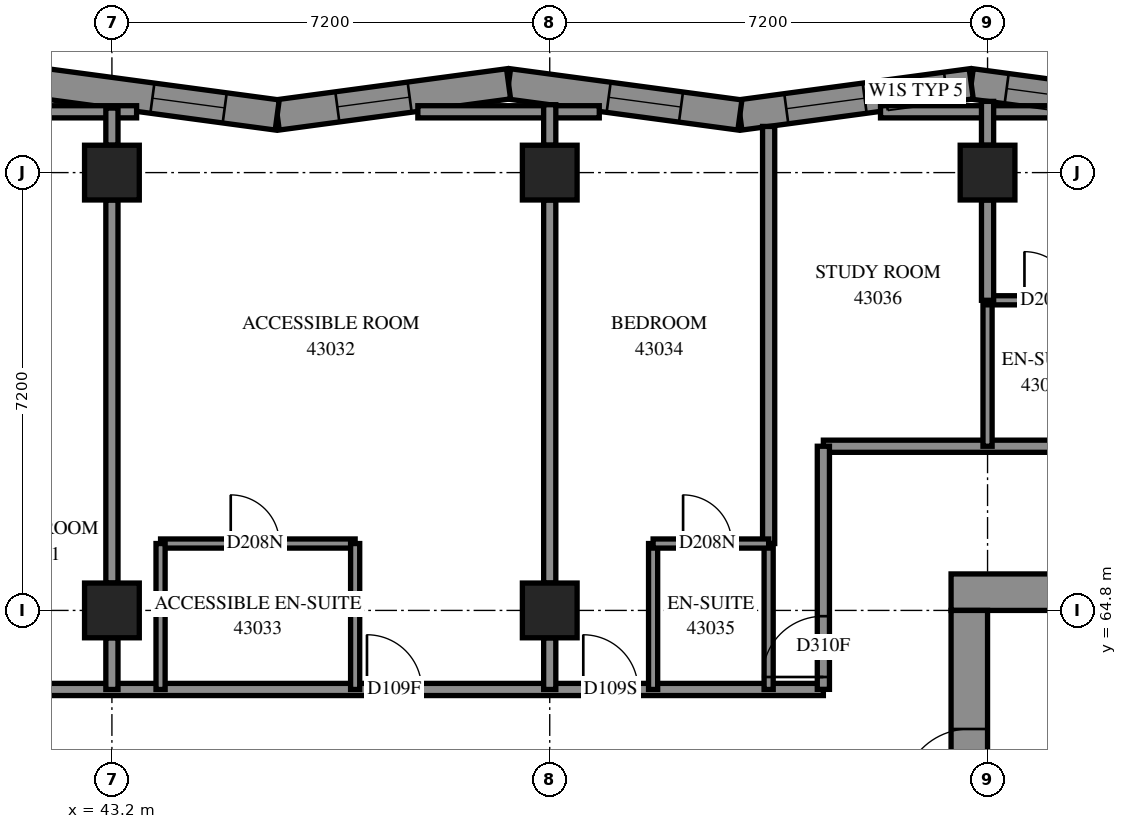
"""IFC4 building model, lengths in metres.
Left out: names, types, materials, properties, quantities, classifications, styles, units other than length and angle.
Written with IfcOpenShell. Run it as: python <this file> out.ifc"""

import sys

from ifc_helpers import new_model, si_unit, direction, frame, frame_2d, origin, origin_2d, place, context, subcontext, project, spatial, polyline, rectangle, outline, extrude, element, fill, save


model = new_model("IFC4")
c1 = context("Model", 3, precision=1e-05, world=origin(), true_north=direction((0.0, 1.0)))
c2 = subcontext(c1, "Body", "Model", "MODEL_VIEW")
j1 = project(units=[si_unit("LENGTHUNIT", "METRE"), si_unit("PLANEANGLEUNIT", "RADIAN")], contexts=[c1])
p1 = place(None, origin())
s1 = spatial("IfcSite", under=j1, at=p1, CompositionType="ELEMENT")
p2 = place(p1, origin())
s2 = spatial("IfcBuilding", under=s1, at=p2, CompositionType="ELEMENT")
p3 = place(p2, frame((0.0, 0.0, 159.2)))
s3 = spatial("IfcBuildingStorey", under=s2, at=p3, CompositionType="ELEMENT", Elevation=159.2)
for number, where, z_axis, x_axis in (
    (1, (43.2, 64.8, 0.0), (0.0, 0.0, 1.0), (1.0, 0.0, 0.0)),
    (2, (43.2, 72.0, 0.0), (0.0, 0.0, 1.0), (1.0, 0.0, 0.0)),
    (3, (50.4, 64.8, 0.0), (0.0, 0.0, 1.0), (1.0, 0.0, 0.0)),
    (4, (50.4, 72.0, 0.0), (0.0, 0.0, 1.0), (1.0, 0.0, 0.0)),
    (5, (57.6, 72.0, 0.0), (0.0, 0.0, 1.0), (1.0, 0.0, 0.0)),
):
    element("IfcColumn", number, at=place(p3, frame(where, z_axis=z_axis, x_axis=x_axis)), inside=s3, PredefinedType="COLUMN", context=c2, shape_type="SweptSolid", body=[
        extrude(rectangle(XDim=0.9, YDim=0.9, at=origin_2d()), origin(), (0.0, 0.0, 1.0), 3.1),
    ])
p4 = place(p3, frame((57.0, 65.1, -0.3), z_axis=(0.0, 0.0, 1.0), x_axis=(1.0, 0.0, 0.0)))
e6 = element("IfcWall", 6, at=p4, inside=s3, PredefinedType="SHEAR", context=c2, shape_type="SweptSolid", body=[
    extrude(rectangle(XDim=15.6, YDim=0.6, at=frame_2d((7.8, 0.0))), origin(), (0.0, 0.0, 1.0), 2.7),
])
p5 = place(p4, frame((10.6, 0.0, 0.3)))
e7 = element("IfcOpeningElement", 7, at=p5, cuts=e6, PredefinedType="OPENING", context=c2, shape_type="SweptSolid", body=[
    extrude(rectangle(XDim=0.8, YDim=2.1, at=frame_2d((0.4, 1.05))), frame((0.0, 0.31, 0.0), z_axis=(0.0, -1.0, 0.0), x_axis=(1.0, 0.0, 0.0)), (0.0, 0.0, 1.0), 0.62),
])
p6 = place(p3, frame((57.3, 50.4, -0.3), z_axis=(0.0, 0.0, 1.0), x_axis=(0.0, 1.0, 0.0)))
e8 = element("IfcWall", 8, at=p6, inside=s3, PredefinedType="SHEAR", context=c2, shape_type="SweptSolid", body=[
    extrude(rectangle(XDim=14.4, YDim=0.6, at=frame_2d((7.2, 0.0))), origin(), (0.0, 0.0, 1.0), 2.7),
])
p7 = place(p6, frame((4.55, 0.0, 0.3)))
e9 = element("IfcOpeningElement", 9, at=p7, cuts=e8, PredefinedType="OPENING", context=c2, shape_type="SweptSolid", body=[
    extrude(rectangle(XDim=1.1, YDim=2.1, at=frame_2d((0.55, 1.05))), frame((0.0, 0.31, 0.0), z_axis=(0.0, -1.0, 0.0), x_axis=(1.0, 0.0, 0.0)), (0.0, 0.0, 1.0), 0.62),
])
p8 = place(p6, frame((11.35, 0.0, 0.3)))
e10 = element("IfcOpeningElement", 10, at=p8, cuts=e8, PredefinedType="OPENING", context=c2, shape_type="SweptSolid", body=[
    extrude(rectangle(XDim=1.1, YDim=2.1, at=frame_2d((0.55, 1.05))), frame((0.0, 0.31, 0.0), z_axis=(0.0, -1.0, 0.0), x_axis=(1.0, 0.0, 0.0)), (0.0, 0.0, 1.0), 0.62),
])
p9 = place(p3, frame((61.136, 72.948, 0.0), z_axis=(0.0, 0.0, 1.0), x_axis=(-0.9910647018, 0.133381996, 0.0)))
e11 = element("IfcWall", 11, at=p9, inside=s3, PredefinedType="SOLIDWALL", context=c2, shape_type="SweptSolid", body=[
    extrude(outline(polyline([(0.034, -0.25), (3.872, -0.25), (3.805, 0.25), (-0.034, 0.25), (0.034, -0.25)])), origin(), (0.0, 0.0, 1.0), 3.1),
])
p10 = place(p9, frame((0.701, 0.0, 0.45)))
e12 = element("IfcOpeningElement", 12, at=p10, cuts=e11, PredefinedType="OPENING", context=c2, shape_type="SweptSolid", body=[
    extrude(rectangle(XDim=1.3, YDim=2.5, at=frame_2d((0.65, 1.25))), frame((0.0, 0.26, 0.0), z_axis=(0.0, -1.0, 0.0), x_axis=(1.0, 0.0, 0.0)), (0.0, 0.0, 1.0), 0.52),
])
p11 = place(p9, frame((2.451, 0.0, 0.45)))
e13 = element("IfcOpeningElement", 13, at=p11, cuts=e11, PredefinedType="OPENING", context=c2, shape_type="SweptSolid", body=[
    extrude(rectangle(XDim=0.8, YDim=2.5, at=frame_2d((0.4, 1.25))), frame((0.0, 0.26, 0.0), z_axis=(0.0, -1.0, 0.0), x_axis=(1.0, 0.0, 0.0)), (0.0, 0.0, 1.0), 0.52),
])
p12 = place(p3, frame((57.332, 73.46, 0.0), z_axis=(0.0, 0.0, 1.0), x_axis=(-0.9910651652, -0.1333785524, 0.0)))
e14 = element("IfcWall", 14, at=p12, inside=s3, PredefinedType="SOLIDWALL", context=c2, shape_type="SweptSolid", body=[
    extrude(outline(polyline([(-0.034, -0.25), (3.805, -0.25), (3.872, 0.25), (0.034, 0.25), (-0.034, -0.25)])), origin(), (0.0, 0.0, 1.0), 3.1),
])
p13 = place(p12, frame((0.419, 0.0, 0.45)))
e15 = element("IfcOpeningElement", 15, at=p13, cuts=e14, PredefinedType="OPENING", context=c2, shape_type="SweptSolid", body=[
    extrude(rectangle(XDim=1.0, YDim=2.5, at=frame_2d((0.5, 1.25))), frame((0.0, 0.26, 0.0), z_axis=(0.0, -1.0, 0.0), x_axis=(1.0, 0.0, 0.0)), (0.0, 0.0, 1.0), 0.52),
])
p14 = place(p12, frame((1.769, 0.0, 0.45)))
e16 = element("IfcOpeningElement", 16, at=p14, cuts=e14, PredefinedType="OPENING", context=c2, shape_type="SweptSolid", body=[
    extrude(rectangle(XDim=1.3, YDim=2.5, at=frame_2d((0.65, 1.25))), frame((0.0, 0.26, 0.0), z_axis=(0.0, -1.0, 0.0), x_axis=(1.0, 0.0, 0.0)), (0.0, 0.0, 1.0), 0.52),
])
p15 = place(p3, frame((53.527, 72.948, 0.0), z_axis=(0.0, 0.0, 1.0), x_axis=(-0.9910647018, 0.133381996, 0.0)))
e17 = element("IfcWall", 17, at=p15, inside=s3, PredefinedType="SOLIDWALL", context=c2, shape_type="SweptSolid", body=[
    extrude(outline(polyline([(0.034, -0.25), (3.872, -0.25), (3.805, 0.25), (-0.034, 0.25), (0.034, -0.25)])), origin(), (0.0, 0.0, 1.0), 3.1),
])
p16 = place(p15, frame((0.978, 0.0, 0.45)))
e18 = element("IfcOpeningElement", 18, at=p16, cuts=e17, PredefinedType="OPENING", context=c2, shape_type="SweptSolid", body=[
    extrude(rectangle(XDim=1.2, YDim=2.5, at=frame_2d((0.6, 1.25))), frame((0.0, 0.26, 0.0), z_axis=(0.0, -1.0, 0.0), x_axis=(1.0, 0.0, 0.0)), (0.0, 0.0, 1.0), 0.52),
])
p17 = place(p3, frame((49.723, 73.46, 0.0), z_axis=(0.0, 0.0, 1.0), x_axis=(-0.9910651652, -0.1333785524, 0.0)))
e19 = element("IfcWall", 19, at=p17, inside=s3, PredefinedType="SOLIDWALL", context=c2, shape_type="SweptSolid", body=[
    extrude(outline(polyline([(-0.034, -0.25), (3.805, -0.25), (3.872, 0.25), (0.034, 0.25), (-0.034, -0.25)])), origin(), (0.0, 0.0, 1.0), 3.1),
])
p18 = place(p17, frame((1.641, 0.0, 0.45)))
e20 = element("IfcOpeningElement", 20, at=p18, cuts=e19, PredefinedType="OPENING", context=c2, shape_type="SweptSolid", body=[
    extrude(rectangle(XDim=1.2, YDim=2.5, at=frame_2d((0.6, 1.25))), frame((0.0, 0.26, 0.0), z_axis=(0.0, -1.0, 0.0), x_axis=(1.0, 0.0, 0.0)), (0.0, 0.0, 1.0), 0.52),
])
p19 = place(p3, frame((45.919, 72.948, 0.0), z_axis=(0.0, 0.0, 1.0), x_axis=(-0.9910651652, 0.1333785524, 0.0)))
e21 = element("IfcWall", 21, at=p19, inside=s3, PredefinedType="SOLIDWALL", context=c2, shape_type="SweptSolid", body=[
    extrude(outline(polyline([(0.034, -0.25), (3.872, -0.25), (3.805, 0.25), (-0.034, 0.25), (0.034, -0.25)])), origin(), (0.0, 0.0, 1.0), 3.1),
])
p20 = place(p19, frame((0.872, 0.0, 0.45)))
e22 = element("IfcOpeningElement", 22, at=p20, cuts=e21, PredefinedType="OPENING", context=c2, shape_type="SweptSolid", body=[
    extrude(rectangle(XDim=1.2, YDim=2.5, at=frame_2d((0.6, 1.25))), frame((0.0, 0.26, 0.0), z_axis=(0.0, -1.0, 0.0), x_axis=(1.0, 0.0, 0.0)), (0.0, 0.0, 1.0), 0.52),
])
p21 = place(p3, frame((54.9, 67.5, 0.0), z_axis=(0.0, 0.0, 1.0), x_axis=(1.0, 0.0, 0.0)))
e23 = element("IfcWall", 23, at=p21, inside=s3, PredefinedType="PARTITIONING", context=c2, shape_type="SweptSolid", body=[
    extrude(rectangle(XDim=19.8, YDim=0.2, at=frame_2d((9.9, 0.0))), origin(), (0.0, 0.0, 1.0), 3.1),
])
p22 = place(p21, frame((6.599, 0.0, 0.0)))
e24 = element("IfcOpeningElement", 24, at=p22, cuts=e23, PredefinedType="OPENING", context=c2, shape_type="SweptSolid", body=[
    extrude(rectangle(XDim=0.9, YDim=2.1, at=frame_2d((0.45, 1.05))), frame((0.0, 0.11, 0.0), z_axis=(0.0, -1.0, 0.0), x_axis=(1.0, 0.0, 0.0)), (0.0, 0.0, 1.0), 0.22),
])
p23 = place(p21, frame((13.799, 0.0, 0.0)))
e25 = element("IfcOpeningElement", 25, at=p23, cuts=e23, PredefinedType="OPENING", context=c2, shape_type="SweptSolid", body=[
    extrude(rectangle(XDim=0.9, YDim=2.1, at=frame_2d((0.45, 1.05))), frame((0.0, 0.11, 0.0), z_axis=(0.0, -1.0, 0.0), x_axis=(1.0, 0.0, 0.0)), (0.0, 0.0, 1.0), 0.22),
])
p24 = place(p3, frame((40.702, 63.5, 0.0), z_axis=(0.0, 0.0, 1.0), x_axis=(1.0, 0.0, 0.0)))
e26 = element("IfcWall", 26, at=p24, inside=s3, PredefinedType="PARTITIONING", context=c2, shape_type="SweptSolid", body=[
    extrude(rectangle(XDim=14.198, YDim=0.2, at=frame_2d((7.099, 0.0))), origin(), (0.0, 0.0, 1.0), 3.1),
])
p25 = place(p24, frame((6.692, 0.0, 0.0)))
e27 = element("IfcOpeningElement", 27, at=p25, cuts=e26, PredefinedType="OPENING", context=c2, shape_type="SweptSolid", body=[
    extrude(rectangle(XDim=0.9, YDim=2.1, at=frame_2d((0.45, 1.05))), frame((0.0, 0.11, 0.0), z_axis=(0.0, -1.0, 0.0), x_axis=(1.0, 0.0, 0.0)), (0.0, 0.0, 1.0), 0.22),
])
p26 = place(p24, frame((10.25, 0.0, 0.0)))
e28 = element("IfcOpeningElement", 28, at=p26, cuts=e26, PredefinedType="OPENING", context=c2, shape_type="SweptSolid", body=[
    extrude(rectangle(XDim=0.9, YDim=2.1, at=frame_2d((0.45, 1.05))), frame((0.0, 0.11, 0.0), z_axis=(0.0, -1.0, 0.0), x_axis=(1.0, 0.0, 0.0)), (0.0, 0.0, 1.0), 0.22),
])
p27 = place(p3, frame((54.0, 65.9, 0.0), z_axis=(0.0, 0.0, 1.0), x_axis=(0.0, 1.0, 0.0)))
e29 = element("IfcWall", 29, at=p27, inside=s3, PredefinedType="PARTITIONING", context=c2, shape_type="SweptSolid", body=[
    extrude(rectangle(XDim=6.859, YDim=0.2, at=frame_2d((3.429, 0.0))), origin(), (0.0, 0.0, 1.0), 3.1),
])
for number, where, z_axis, x_axis in (
    (30, (43.2, 65.25, 0.0), (0.0, 0.0, 1.0), (0.0, 1.0, 0.0)),
    (31, (50.4, 65.25, 0.0), (0.0, 0.0, 1.0), (0.0, 1.0, 0.0)),
):
    element("IfcWall", number, at=place(p3, frame(where, z_axis=z_axis, x_axis=x_axis)), inside=s3, PredefinedType="PARTITIONING", context=c2, shape_type="SweptSolid", body=[
        extrude(rectangle(XDim=6.3, YDim=0.2, at=frame_2d((3.15, 0.0))), origin(), (0.0, 0.0, 1.0), 3.1),
    ])
p28 = place(p3, frame((54.9, 63.502, 0.0), z_axis=(0.0, 0.0, 1.0), x_axis=(0.0, 1.0, 0.0)))
e32 = element("IfcWall", 32, at=p28, inside=s3, PredefinedType="PARTITIONING", context=c2, shape_type="SweptSolid", body=[
    extrude(rectangle(XDim=3.998, YDim=0.2, at=frame_2d((1.999, 0.0))), origin(), (0.0, 0.0, 1.0), 3.1),
])
p29 = place(p28, frame((0.203, 0.0, 0.0)))
e33 = element("IfcOpeningElement", 33, at=p29, cuts=e32, PredefinedType="OPENING", context=c2, shape_type="SweptSolid", body=[
    extrude(rectangle(XDim=1.0, YDim=2.1, at=frame_2d((0.5, 1.05))), frame((0.0, 0.11, 0.0), z_axis=(0.0, -1.0, 0.0), x_axis=(1.0, 0.0, 0.0)), (0.0, 0.0, 1.0), 0.22),
])
p30 = place(p3, frame((44.0, 65.9, 0.0), z_axis=(0.0, 0.0, 1.0), x_axis=(1.0, 0.0, 0.0)))
e34 = element("IfcWall", 34, at=p30, inside=s3, PredefinedType="PARTITIONING", context=c2, shape_type="SweptSolid", body=[
    extrude(rectangle(XDim=3.2, YDim=0.15, at=frame_2d((1.6, 0.0))), origin(), (0.0, 0.0, 1.0), 3.1),
])
p31 = place(p30, frame((1.154, 0.0, 0.0)))
e35 = element("IfcOpeningElement", 35, at=p31, cuts=e34, PredefinedType="OPENING", context=c2, shape_type="SweptSolid", body=[
    extrude(rectangle(XDim=0.8, YDim=2.1, at=frame_2d((0.4, 1.05))), frame((0.0, 0.085, 0.0), z_axis=(0.0, -1.0, 0.0), x_axis=(1.0, 0.0, 0.0)), (0.0, 0.0, 1.0), 0.17),
])
for number, where, z_axis, x_axis in (
    (36, (40.622, 73.0, 0.0), (0.0, 0.0, 1.0), (1.0, 0.0, 0.0)),
    (37, (48.231, 73.0, 0.0), (0.0, 0.0, 1.0), (1.0, 0.0, 0.0)),
    (38, (55.84, 73.0, 0.0), (0.0, 0.0, 1.0), (1.0, 0.0, 0.0)),
):
    element("IfcWall", number, at=place(p3, frame(where, z_axis=z_axis, x_axis=x_axis)), inside=s3, PredefinedType="PARTITIONING", context=c2, shape_type="SweptSolid", body=[
        extrude(rectangle(XDim=2.983, YDim=0.2, at=frame_2d((1.492, 0.0))), origin(), (0.0, 0.0, 1.0), 3.1),
    ])
for number, where, z_axis, x_axis in (
    (39, (44.0, 63.5, 0.0), (0.0, 0.0, 1.0), (0.0, 1.0, 0.0)),
    (40, (47.2, 63.5, 0.0), (0.0, 0.0, 1.0), (0.0, 1.0, 0.0)),
    (41, (52.1, 63.5, 0.0), (0.0, 0.0, 1.0), (0.0, 1.0, 0.0)),
    (42, (54.0, 63.5, 0.0), (0.0, 0.0, 1.0), (0.0, 1.0, 0.0)),
    (43, (57.6, 67.5, 0.0), (0.0, 0.0, 1.0), (0.0, 1.0, 0.0)),
):
    element("IfcWall", number, at=place(p3, frame(where, z_axis=z_axis, x_axis=x_axis)), inside=s3, PredefinedType="PARTITIONING", context=c2, shape_type="SweptSolid", body=[
        extrude(rectangle(XDim=2.4, YDim=0.15, at=frame_2d((1.2, 0.0))), origin(), (0.0, 0.0, 1.0), 3.1),
    ])
p32 = place(p3, frame((52.1, 65.9, 0.0), z_axis=(0.0, 0.0, 1.0), x_axis=(1.0, 0.0, 0.0)))
e44 = element("IfcWall", 44, at=p32, inside=s3, PredefinedType="PARTITIONING", context=c2, shape_type="SweptSolid", body=[
    extrude(rectangle(XDim=1.9, YDim=0.15, at=frame_2d((0.95, 0.0))), origin(), (0.0, 0.0, 1.0), 3.1),
])
p33 = place(p32, frame((0.493, 0.0, 0.0)))
e45 = element("IfcOpeningElement", 45, at=p33, cuts=e44, PredefinedType="OPENING", context=c2, shape_type="SweptSolid", body=[
    extrude(rectangle(XDim=0.8, YDim=2.1, at=frame_2d((0.4, 1.05))), frame((0.0, 0.085, 0.0), z_axis=(0.0, -1.0, 0.0), x_axis=(1.0, 0.0, 0.0)), (0.0, 0.0, 1.0), 0.17),
])
p34 = place(p3, frame((57.6, 69.9, 0.0), z_axis=(0.0, 0.0, 1.0), x_axis=(1.0, 0.0, 0.0)))
e46 = element("IfcWall", 46, at=p34, inside=s3, PredefinedType="PARTITIONING", context=c2, shape_type="SweptSolid", body=[
    extrude(rectangle(XDim=1.9, YDim=0.15, at=frame_2d((0.95, 0.0))), origin(), (0.0, 0.0, 1.0), 3.1),
])
p35 = place(p34, frame((0.607, 0.0, 0.0)))
e47 = element("IfcOpeningElement", 47, at=p35, cuts=e46, PredefinedType="OPENING", context=c2, shape_type="SweptSolid", body=[
    extrude(rectangle(XDim=0.8, YDim=2.1, at=frame_2d((0.4, 1.05))), frame((0.0, 0.085, 0.0), z_axis=(0.0, -1.0, 0.0), x_axis=(1.0, 0.0, 0.0)), (0.0, 0.0, 1.0), 0.17),
])
p36 = place(p3, frame((57.6, 69.9, 0.0), z_axis=(0.0, 0.0, 1.0), x_axis=(0.0, 1.0, 0.0)))
e48 = element("IfcWall", 48, at=p36, inside=s3, PredefinedType="PARTITIONING", context=c2, shape_type="SweptSolid", body=[
    extrude(rectangle(XDim=1.65, YDim=0.2, at=frame_2d((0.825, 0.0))), origin(), (0.0, 0.0, 1.0), 3.1),
])
for number, where, z_axis, x_axis in (
    (49, (43.2, 63.5, 0.0), (0.0, 0.0, 1.0), (0.0, 1.0, 0.0)),
    (50, (50.4, 63.5, 0.0), (0.0, 0.0, 1.0), (0.0, 1.0, 0.0)),
):
    element("IfcWall", number, at=place(p3, frame(where, z_axis=z_axis, x_axis=x_axis)), inside=s3, PredefinedType="PARTITIONING", context=c2, shape_type="SweptSolid", body=[
        extrude(rectangle(XDim=0.85, YDim=0.2, at=frame_2d((0.425, 0.0))), origin(), (0.0, 0.0, 1.0), 3.1),
    ])
p37 = place(p3, frame((50.4, 72.45, 0.0), z_axis=(0.0, 0.0, 1.0), x_axis=(0.0, 1.0, 0.0)))
e51 = element("IfcWall", 51, at=p37, inside=s3, PredefinedType="PARTITIONING", context=c2, shape_type="SweptSolid", body=[
    extrude(rectangle(XDim=0.666, YDim=0.2, at=frame_2d((0.333, 0.0))), origin(), (0.0, 0.0, 1.0), 3.1),
])
p38 = place(p3, frame((43.2, 72.45, 0.0), z_axis=(0.0, 0.0, 1.0), x_axis=(0.0, 1.0, 0.0)))
e52 = element("IfcWall", 52, at=p38, inside=s3, PredefinedType="PARTITIONING", context=c2, shape_type="SweptSolid", body=[
    extrude(rectangle(XDim=0.611, YDim=0.2, at=frame_2d((0.306, 0.0))), origin(), (0.0, 0.0, 1.0), 3.1),
])
p39 = place(p3, frame((57.6, 72.45, 0.0), z_axis=(0.0, 0.0, 1.0), x_axis=(0.0, 1.0, 0.0)))
e53 = element("IfcWall", 53, at=p39, inside=s3, PredefinedType="PARTITIONING", context=c2, shape_type="SweptSolid", body=[
    extrude(rectangle(XDim=0.721, YDim=0.2, at=frame_2d((0.361, 0.0))), origin(), (0.0, 0.0, 1.0), 3.1),
])
p40 = place(p16, origin())
e54 = element("IfcWindow", 54, at=p40, inside=s3, PartitioningType="SINGLE_PANEL", PredefinedType="WINDOW", context=c2, shape_type="SweptSolid", body=[
    extrude(rectangle(XDim=1.2, YDim=2.5, at=frame_2d((0.6, 1.25))), frame((0.0, 0.18, 0.0), z_axis=(0.0, -1.0, 0.0), x_axis=(1.0, 0.0, 0.0)), (0.0, 0.0, 1.0), 0.06),
])
fill(e18, e54)
p41 = place(p18, origin())
e55 = element("IfcWindow", 55, at=p41, inside=s3, PartitioningType="SINGLE_PANEL", PredefinedType="WINDOW", context=c2, shape_type="SweptSolid", body=[
    extrude(rectangle(XDim=1.2, YDim=2.5, at=frame_2d((0.6, 1.25))), frame((0.0, 0.18, 0.0), z_axis=(0.0, -1.0, 0.0), x_axis=(1.0, 0.0, 0.0)), (0.0, 0.0, 1.0), 0.06),
])
fill(e20, e55)
p42 = place(p20, origin())
e56 = element("IfcWindow", 56, at=p42, inside=s3, PartitioningType="SINGLE_PANEL", PredefinedType="WINDOW", context=c2, shape_type="SweptSolid", body=[
    extrude(rectangle(XDim=1.2, YDim=2.5, at=frame_2d((0.6, 1.25))), frame((0.0, 0.18, 0.0), z_axis=(0.0, -1.0, 0.0), x_axis=(1.0, 0.0, 0.0)), (0.0, 0.0, 1.0), 0.06),
])
fill(e22, e56)
p43 = place(p8, origin())
e57 = element("IfcDoor", 57, at=p43, inside=s3, OperationType="SINGLE_SWING_LEFT", PredefinedType="DOOR", context=c2, shape_type="SweptSolid", body=[
    extrude(rectangle(XDim=1.1, YDim=2.1, at=frame_2d((0.55, 1.05))), frame((0.0, 0.025, 0.0), z_axis=(0.0, -1.0, 0.0), x_axis=(1.0, 0.0, 0.0)), (0.0, 0.0, 1.0), 0.05),
])
fill(e10, e57)
p44 = place(p25, origin())
e58 = element("IfcDoor", 58, at=p44, inside=s3, OperationType="SINGLE_SWING_RIGHT", PredefinedType="DOOR", context=c2, shape_type="SweptSolid", body=[
    extrude(rectangle(XDim=0.9, YDim=2.1, at=frame_2d((0.45, 1.05))), frame((0.0, 0.025, 0.0), z_axis=(0.0, -1.0, 0.0), x_axis=(1.0, 0.0, 0.0)), (0.0, 0.0, 1.0), 0.05),
])
fill(e27, e58)
p45 = place(p31, origin())
e59 = element("IfcDoor", 59, at=p45, inside=s3, OperationType="SINGLE_SWING_RIGHT", PredefinedType="DOOR", context=c2, shape_type="SweptSolid", body=[
    extrude(rectangle(XDim=0.8, YDim=2.1, at=frame_2d((0.4, 1.05))), frame((0.0, 0.025, 0.0), z_axis=(0.0, -1.0, 0.0), x_axis=(1.0, 0.0, 0.0)), (0.0, 0.0, 1.0), 0.05),
])
fill(e35, e59)
p46 = place(p26, origin())
e60 = element("IfcDoor", 60, at=p46, inside=s3, OperationType="SINGLE_SWING_RIGHT", PredefinedType="DOOR", context=c2, shape_type="SweptSolid", body=[
    extrude(rectangle(XDim=0.9, YDim=2.1, at=frame_2d((0.45, 1.05))), frame((0.0, 0.025, 0.0), z_axis=(0.0, -1.0, 0.0), x_axis=(1.0, 0.0, 0.0)), (0.0, 0.0, 1.0), 0.05),
])
fill(e28, e60)
p47 = place(p33, origin())
e61 = element("IfcDoor", 61, at=p47, inside=s3, OperationType="SINGLE_SWING_RIGHT", PredefinedType="DOOR", context=c2, shape_type="SweptSolid", body=[
    extrude(rectangle(XDim=0.8, YDim=2.1, at=frame_2d((0.4, 1.05))), frame((0.0, 0.025, 0.0), z_axis=(0.0, -1.0, 0.0), x_axis=(1.0, 0.0, 0.0)), (0.0, 0.0, 1.0), 0.05),
])
fill(e45, e61)
p48 = place(p29, origin())
e62 = element("IfcDoor", 62, at=p48, inside=s3, OperationType="SINGLE_SWING_LEFT", PredefinedType="DOOR", context=c2, shape_type="SweptSolid", body=[
    extrude(rectangle(XDim=1.0, YDim=2.1, at=frame_2d((0.5, 1.05))), frame((0.0, 0.025, 0.0), z_axis=(0.0, -1.0, 0.0), x_axis=(1.0, 0.0, 0.0)), (0.0, 0.0, 1.0), 0.05),
])
fill(e33, e62)
p49 = place(p35, origin())
e63 = element("IfcDoor", 63, at=p49, inside=s3, OperationType="SINGLE_SWING_RIGHT", PredefinedType="DOOR", context=c2, shape_type="SweptSolid", body=[
    extrude(rectangle(XDim=0.8, YDim=2.1, at=frame_2d((0.4, 1.05))), frame((0.0, 0.025, 0.0), z_axis=(0.0, -1.0, 0.0), x_axis=(1.0, 0.0, 0.0)), (0.0, 0.0, 1.0), 0.05),
])
fill(e47, e63)
p50 = place(p11, origin())
e64 = element("IfcWindow", 64, at=p50, inside=s3, PartitioningType="SINGLE_PANEL", PredefinedType="WINDOW", context=c2, shape_type="SweptSolid", body=[
    extrude(rectangle(XDim=0.8, YDim=2.5, at=frame_2d((0.4, 1.25))), frame((0.0, 0.14, 0.0), z_axis=(0.0, -1.0, 0.0), x_axis=(1.0, 0.0, 0.0)), (0.0, 0.0, 1.0), 0.06),
])
fill(e13, e64)
p51 = place(p13, origin())
e65 = element("IfcWindow", 65, at=p51, inside=s3, PartitioningType="SINGLE_PANEL", PredefinedType="WINDOW", context=c2, shape_type="SweptSolid", body=[
    extrude(rectangle(XDim=1.0, YDim=2.5, at=frame_2d((0.5, 1.25))), frame((0.0, 0.14, 0.0), z_axis=(0.0, -1.0, 0.0), x_axis=(1.0, 0.0, 0.0)), (0.0, 0.0, 1.0), 0.06),
])
fill(e15, e65)
p52 = place(p14, origin())
e66 = element("IfcWindow", 66, at=p52, inside=s3, PartitioningType="SINGLE_PANEL", PredefinedType="WINDOW", context=c2, shape_type="SweptSolid", body=[
    extrude(rectangle(XDim=1.3, YDim=2.5, at=frame_2d((0.65, 1.25))), frame((0.0, 0.18, 0.0), z_axis=(0.0, -1.0, 0.0), x_axis=(1.0, 0.0, 0.0)), (0.0, 0.0, 1.0), 0.06),
])
fill(e16, e66)
save(model, sys.argv[1])
